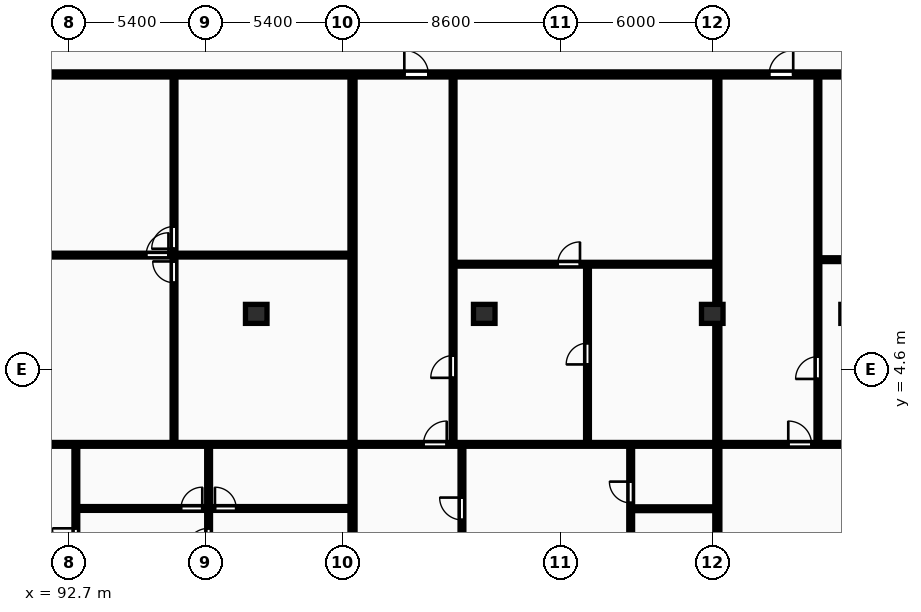
"""IFC4 building model, lengths in metres.
Left out: names, types, materials, properties, quantities, classifications, styles, units other than length and angle.
Written with IfcOpenShell. Run it as: python <this file> out.ifc"""

import sys

from ifc_helpers import new_model, si_unit, direction, frame, frame_2d, origin, origin_2d, place, context, subcontext, project, spatial, rectangle, extrude, element, fill, save


model = new_model("IFC4")
c1 = context("Model", 3, precision=1e-05, world=origin(), true_north=direction((0.0, 1.0)))
c2 = subcontext(c1, "Body", "Model", "MODEL_VIEW")
j1 = project(units=[si_unit("LENGTHUNIT", "METRE"), si_unit("PLANEANGLEUNIT", "RADIAN")], contexts=[c1])
p1 = place(None, origin())
s1 = spatial("IfcSite", under=j1, at=p1, CompositionType="ELEMENT")
p2 = place(p1, origin())
s2 = spatial("IfcBuilding", under=s1, at=p2, CompositionType="ELEMENT")
p3 = place(p2, frame((0.0, 0.0, 80.8)))
s3 = spatial("IfcBuildingStorey", under=s2, at=p3, CompositionType="ELEMENT", Elevation=80.8)
for number, where, z_axis, x_axis in (
    (1, (100.1, 6.8, 0.0), (0.0, 0.0, 1.0), (1.0, 0.0, 0.0)),
    (2, (109.1, 6.8, 0.0), (0.0, 0.0, 1.0), (1.0, 0.0, 0.0)),
    (3, (118.1, 6.8, 0.0), (0.0, 0.0, 1.0), (1.0, 0.0, 0.0)),
    (4, (123.6, 6.8, 0.0), (0.0, 0.0, 1.0), (1.0, 0.0, 0.0)),
):
    element("IfcColumn", number, at=place(p3, frame(where, z_axis=z_axis, x_axis=x_axis)), inside=s3, PredefinedType="COLUMN", context=c2, shape_type="SweptSolid", body=[
        extrude(rectangle(XDim=0.85, YDim=0.75, at=origin_2d()), origin(), (0.0, 0.0, 1.0), 3.25),
    ])
p4 = place(p3, frame((103.9, -8.7, 0.0), z_axis=(0.0, 0.0, 1.0), x_axis=(0.0, 1.0, 0.0)))
e5 = element("IfcWall", 5, at=p4, inside=s3, PredefinedType="PARTITIONING", context=c2, shape_type="SweptSolid", body=[
    extrude(rectangle(XDim=24.87, YDim=0.2, at=frame_2d((12.435, 0.0))), origin(), (0.0, 0.0, 1.0), 2.97),
])
p5 = place(p3, frame((96.855, 1.69, 0.0), z_axis=(0.0, 0.0, 1.0), x_axis=(0.0, 1.0, 0.0)))
e6 = element("IfcWall", 6, at=p5, inside=s3, PredefinedType="PARTITIONING", context=c2, shape_type="SweptSolid", body=[
    extrude(rectangle(XDim=14.5, YDim=0.15, at=frame_2d((7.25, 0.0))), origin(), (0.0, 0.0, 1.0), 2.97),
])
p6 = place(p5, frame((6.34, 0.0, 0.0)))
e7 = element("IfcOpeningElement", 7, at=p6, cuts=e6, PredefinedType="OPENING", context=c2, shape_type="SweptSolid", body=[
    extrude(rectangle(XDim=0.84, YDim=2.04, at=frame_2d((0.42, 1.02))), frame((0.0, 0.085, 0.0), z_axis=(0.0, -1.0, 0.0), x_axis=(1.0, 0.0, 0.0)), (0.0, 0.0, 1.0), 0.17),
])
p7 = place(p5, frame((7.68, 0.0, 0.0)))
e8 = element("IfcOpeningElement", 8, at=p7, cuts=e6, PredefinedType="OPENING", context=c2, shape_type="SweptSolid", body=[
    extrude(rectangle(XDim=0.88, YDim=2.06, at=frame_2d((0.44, 1.03))), frame((0.0, 0.085, 0.0), z_axis=(0.0, -1.0, 0.0), x_axis=(1.0, 0.0, 0.0)), (0.0, 0.0, 1.0), 0.17),
])
p8 = place(p3, frame((90.13, 9.12, 0.0), z_axis=(0.0, 0.0, 1.0), x_axis=(1.0, 0.0, 0.0)))
e9 = element("IfcWall", 9, at=p8, inside=s3, PredefinedType="PARTITIONING", context=c2, shape_type="SweptSolid", body=[
    extrude(rectangle(XDim=13.69, YDim=0.15, at=frame_2d((6.845, 0.0))), origin(), (0.0, 0.0, 1.0), 2.97),
])
p9 = place(p8, frame((5.625, 0.0, 0.0)))
e10 = element("IfcOpeningElement", 10, at=p9, cuts=e9, PredefinedType="OPENING", context=c2, shape_type="SweptSolid", body=[
    extrude(rectangle(XDim=0.88, YDim=2.06, at=frame_2d((0.44, 1.03))), frame((0.0, 0.085, 0.0), z_axis=(0.0, -1.0, 0.0), x_axis=(1.0, 0.0, 0.0)), (0.0, 0.0, 1.0), 0.17),
])
p10 = place(p3, frame((92.98, -8.7, 0.0), z_axis=(0.0, 0.0, 1.0), x_axis=(0.0, 1.0, 0.0)))
e11 = element("IfcWall", 11, at=p10, inside=s3, PredefinedType="PARTITIONING", context=c2, shape_type="SweptSolid", body=[
    extrude(rectangle(XDim=10.31, YDim=0.15, at=frame_2d((5.155, 0.0))), origin(), (0.0, 0.0, 1.0), 2.97),
])
p11 = place(p10, frame((6.116, 0.0, 0.0)))
e12 = element("IfcOpeningElement", 12, at=p11, cuts=e11, PredefinedType="OPENING", context=c2, shape_type="SweptSolid", body=[
    extrude(rectangle(XDim=0.92, YDim=2.08, at=frame_2d((0.46, 1.04))), frame((0.0, 0.085, 0.0), z_axis=(0.0, -1.0, 0.0), x_axis=(1.0, 0.0, 0.0)), (0.0, 0.0, 1.0), 0.17),
])
p12 = place(p3, frame((98.22, -0.86, 0.0), z_axis=(0.0, 0.0, 1.0), x_axis=(0.0, 1.0, 0.0)))
e13 = element("IfcWall", 13, at=p12, inside=s3, PredefinedType="PARTITIONING", context=c2, shape_type="SweptSolid", body=[
    extrude(rectangle(XDim=2.47, YDim=0.15, at=frame_2d((1.235, 0.0))), origin(), (0.0, 0.0, 1.0), 2.97),
])
p13 = place(p3, frame((98.22, -8.7, 0.0), z_axis=(0.0, 0.0, 1.0), x_axis=(0.0, 1.0, 0.0)))
e14 = element("IfcWall", 14, at=p13, inside=s3, PredefinedType="PARTITIONING", context=c2, shape_type="SweptSolid", body=[
    extrude(rectangle(XDim=7.8, YDim=0.15, at=frame_2d((3.9, 0.0))), origin(), (0.0, 0.0, 1.0), 2.97),
])
p14 = place(p13, frame((6.116, 0.0, 0.0)))
e15 = element("IfcOpeningElement", 15, at=p14, cuts=e14, PredefinedType="OPENING", context=c2, shape_type="SweptSolid", body=[
    extrude(rectangle(XDim=0.92, YDim=2.08, at=frame_2d((0.46, 1.04))), frame((0.0, 0.085, 0.0), z_axis=(0.0, -1.0, 0.0), x_axis=(1.0, 0.0, 0.0)), (0.0, 0.0, 1.0), 0.17),
])
p15 = place(p3, frame((93.02, -0.88, 0.0), z_axis=(0.0, 0.0, 1.0), x_axis=(1.0, 0.0, 0.0)))
e16 = element("IfcWall", 16, at=p15, inside=s3, PredefinedType="PARTITIONING", context=c2, shape_type="SweptSolid", body=[
    extrude(rectangle(XDim=10.8, YDim=0.15, at=frame_2d((5.4, 0.0))), origin(), (0.0, 0.0, 1.0), 2.97),
])
p16 = place(p15, frame((4.11, 0.0, 0.0)))
e17 = element("IfcOpeningElement", 17, at=p16, cuts=e16, PredefinedType="OPENING", context=c2, shape_type="SweptSolid", body=[
    extrude(rectangle(XDim=0.84, YDim=2.04, at=frame_2d((0.42, 1.02))), frame((0.0, 0.085, 0.0), z_axis=(0.0, -1.0, 0.0), x_axis=(1.0, 0.0, 0.0)), (0.0, 0.0, 1.0), 0.17),
])
p17 = place(p15, frame((5.45, 0.0, 0.0)))
e18 = element("IfcOpeningElement", 18, at=p17, cuts=e16, PredefinedType="OPENING", context=c2, shape_type="SweptSolid", body=[
    extrude(rectangle(XDim=0.84, YDim=2.04, at=frame_2d((0.42, 1.02))), frame((0.0, 0.085, 0.0), z_axis=(0.0, -1.0, 0.0), x_axis=(1.0, 0.0, 0.0)), (0.0, 0.0, 1.0), 0.17),
])
p18 = place(p3, frame((86.18, 1.65, 0.0), z_axis=(0.0, 0.0, 1.0), x_axis=(1.0, 0.0, 0.0)))
e19 = element("IfcWall", 19, at=p18, inside=s3, PredefinedType="PARTITIONING", context=c2, shape_type="SweptSolid", body=[
    extrude(rectangle(XDim=17.64, YDim=0.15, at=frame_2d((8.82, 0.0))), origin(), (0.0, 0.0, 1.0), 2.97),
])
p19 = place(p18, frame((2.72, 0.0, 0.0)))
e20 = element("IfcOpeningElement", 20, at=p19, cuts=e19, PredefinedType="OPENING", context=c2, shape_type="SweptSolid", body=[
    extrude(rectangle(XDim=0.92, YDim=2.08, at=frame_2d((0.46, 1.04))), frame((0.0, 0.085, 0.0), z_axis=(0.0, -1.0, 0.0), x_axis=(1.0, 0.0, 0.0)), (0.0, 0.0, 1.0), 0.17),
])
p20 = place(p3, frame((118.3, -8.7, 0.0), z_axis=(0.0, 0.0, 1.0), x_axis=(0.0, 1.0, 0.0)))
e21 = element("IfcWall", 21, at=p20, inside=s3, PredefinedType="PARTITIONING", context=c2, shape_type="SweptSolid", body=[
    extrude(rectangle(XDim=24.87, YDim=0.2, at=frame_2d((12.435, 0.0))), origin(), (0.0, 0.0, 1.0), 2.2),
])
p21 = place(p3, frame((113.175, 1.69, 0.0), z_axis=(0.0, 0.0, 1.0), x_axis=(0.0, 1.0, 0.0)))
e22 = element("IfcWall", 22, at=p21, inside=s3, PredefinedType="PARTITIONING", context=c2, shape_type="SweptSolid", body=[
    extrude(rectangle(XDim=7.07, YDim=0.15, at=frame_2d((3.535, 0.0))), origin(), (0.0, 0.0, 1.0), 2.97),
])
p22 = place(p21, frame((3.115, 0.0, 0.0)))
e23 = element("IfcOpeningElement", 23, at=p22, cuts=e22, PredefinedType="OPENING", context=c2, shape_type="SweptSolid", body=[
    extrude(rectangle(XDim=0.84, YDim=2.04, at=frame_2d((0.42, 1.02))), frame((0.0, 0.085, 0.0), z_axis=(0.0, -1.0, 0.0), x_axis=(1.0, 0.0, 0.0)), (0.0, 0.0, 1.0), 0.17),
])
p23 = place(p3, frame((107.93, 8.76, 0.0), z_axis=(0.0, 0.0, 1.0), x_axis=(1.0, 0.0, 0.0)))
e24 = element("IfcWall", 24, at=p23, inside=s3, PredefinedType="PARTITIONING", context=c2, shape_type="SweptSolid", body=[
    extrude(rectangle(XDim=10.29, YDim=0.15, at=frame_2d((5.145, 0.0))), origin(), (0.0, 0.0, 1.0), 2.97),
])
p24 = place(p23, frame((4.069, 0.0, 0.0)))
e25 = element("IfcOpeningElement", 25, at=p24, cuts=e24, PredefinedType="OPENING", context=c2, shape_type="SweptSolid", body=[
    extrude(rectangle(XDim=0.88, YDim=2.06, at=frame_2d((0.44, 1.03))), frame((0.0, 0.085, 0.0), z_axis=(0.0, -1.0, 0.0), x_axis=(1.0, 0.0, 0.0)), (0.0, 0.0, 1.0), 0.17),
])
p25 = place(p3, frame((107.87, 1.69, 0.0), z_axis=(0.0, 0.0, 1.0), x_axis=(0.0, 1.0, 0.0)))
e26 = element("IfcWall", 26, at=p25, inside=s3, PredefinedType="PARTITIONING", context=c2, shape_type="SweptSolid", body=[
    extrude(rectangle(XDim=14.5, YDim=0.15, at=frame_2d((7.25, 0.0))), origin(), (0.0, 0.0, 1.0), 2.97),
])
p26 = place(p25, frame((2.586, 0.0, 0.0)))
e27 = element("IfcOpeningElement", 27, at=p26, cuts=e26, PredefinedType="OPENING", context=c2, shape_type="SweptSolid", body=[
    extrude(rectangle(XDim=0.88, YDim=2.06, at=frame_2d((0.44, 1.03))), frame((0.0, 0.085, 0.0), z_axis=(0.0, -1.0, 0.0), x_axis=(1.0, 0.0, 0.0)), (0.0, 0.0, 1.0), 0.17),
])
p27 = place(p3, frame((108.22, -3.39, 0.0), z_axis=(0.0, 0.0, 1.0), x_axis=(0.0, 1.0, 0.0)))
e28 = element("IfcWall", 28, at=p27, inside=s3, PredefinedType="PARTITIONING", context=c2, shape_type="SweptSolid", body=[
    extrude(rectangle(XDim=5.0, YDim=0.15, at=frame_2d((2.5, 0.0))), origin(), (0.0, 0.0, 1.0), 2.97),
])
p28 = place(p27, frame((2.06, 0.0, 0.0)))
e29 = element("IfcOpeningElement", 29, at=p28, cuts=e28, PredefinedType="OPENING", context=c2, shape_type="SweptSolid", body=[
    extrude(rectangle(XDim=0.88, YDim=2.06, at=frame_2d((0.44, 1.03))), frame((0.0, 0.085, 0.0), z_axis=(0.0, -1.0, 0.0), x_axis=(1.0, 0.0, 0.0)), (0.0, 0.0, 1.0), 0.17),
])
p29 = place(p3, frame((114.94, -0.89, 0.0), z_axis=(0.0, 0.0, 1.0), x_axis=(1.0, 0.0, 0.0)))
e30 = element("IfcWall", 30, at=p29, inside=s3, PredefinedType="PARTITIONING", context=c2, shape_type="SweptSolid", body=[
    extrude(rectangle(XDim=3.28, YDim=0.15, at=frame_2d((1.64, 0.0))), origin(), (0.0, 0.0, 1.0), 2.97),
])
p30 = place(p3, frame((114.88, -8.7, 0.0), z_axis=(0.0, 0.0, 1.0), x_axis=(0.0, 1.0, 0.0)))
e31 = element("IfcWall", 31, at=p30, inside=s3, PredefinedType="PARTITIONING", context=c2, shape_type="SweptSolid", body=[
    extrude(rectangle(XDim=10.31, YDim=0.15, at=frame_2d((5.155, 0.0))), origin(), (0.0, 0.0, 1.0), 2.97),
])
p31 = place(p30, frame((5.55, 0.0, 0.0)))
e32 = element("IfcOpeningElement", 32, at=p31, cuts=e31, PredefinedType="OPENING", context=c2, shape_type="SweptSolid", body=[
    extrude(rectangle(XDim=0.84, YDim=2.04, at=frame_2d((0.42, 1.02))), frame((0.0, 0.085, 0.0), z_axis=(0.0, -1.0, 0.0), x_axis=(1.0, 0.0, 0.0)), (0.0, 0.0, 1.0), 0.17),
])
p32 = place(p30, frame((8.04, 0.0, 0.0)))
e33 = element("IfcOpeningElement", 33, at=p32, cuts=e31, PredefinedType="OPENING", context=c2, shape_type="SweptSolid", body=[
    extrude(rectangle(XDim=0.84, YDim=2.04, at=frame_2d((0.42, 1.02))), frame((0.0, 0.085, 0.0), z_axis=(0.0, -1.0, 0.0), x_axis=(1.0, 0.0, 0.0)), (0.0, 0.0, 1.0), 0.17),
])
p33 = place(p30, frame((3.95, 0.0, 0.0)))
e34 = element("IfcOpeningElement", 34, at=p33, cuts=e31, PredefinedType="OPENING", context=c2, shape_type="SweptSolid", body=[
    extrude(rectangle(XDim=0.88, YDim=2.06, at=frame_2d((0.44, 1.03))), frame((0.0, 0.085, 0.0), z_axis=(0.0, -1.0, 0.0), x_axis=(1.0, 0.0, 0.0)), (0.0, 0.0, 1.0), 0.17),
])
p34 = place(p3, frame((103.98, 1.65, 0.0), z_axis=(0.0, 0.0, 1.0), x_axis=(1.0, 0.0, 0.0)))
e35 = element("IfcWall", 35, at=p34, inside=s3, PredefinedType="PARTITIONING", context=c2, shape_type="SweptSolid", body=[
    extrude(rectangle(XDim=14.24, YDim=0.15, at=frame_2d((7.12, 0.0))), origin(), (0.0, 0.0, 1.0), 2.97),
])
p35 = place(p34, frame((2.72, 0.0, 0.0)))
e36 = element("IfcOpeningElement", 36, at=p35, cuts=e35, PredefinedType="OPENING", context=c2, shape_type="SweptSolid", body=[
    extrude(rectangle(XDim=0.92, YDim=2.08, at=frame_2d((0.46, 1.04))), frame((0.0, 0.085, 0.0), z_axis=(0.0, -1.0, 0.0), x_axis=(1.0, 0.0, 0.0)), (0.0, 0.0, 1.0), 0.17),
])
p36 = place(p3, frame((122.33, 8.94, 0.0), z_axis=(0.0, 0.0, 1.0), x_axis=(1.0, 0.0, 0.0)))
e37 = element("IfcWall", 37, at=p36, inside=s3, PredefinedType="PARTITIONING", context=c2, shape_type="SweptSolid", body=[
    extrude(rectangle(XDim=8.29, YDim=0.15, at=frame_2d((4.145, 0.0))), origin(), (0.0, 0.0, 1.0), 2.97),
])
p37 = place(p36, frame((3.705, 0.0, 0.0)))
e38 = element("IfcOpeningElement", 38, at=p37, cuts=e37, PredefinedType="OPENING", context=c2, shape_type="SweptSolid", body=[
    extrude(rectangle(XDim=0.88, YDim=2.06, at=frame_2d((0.44, 1.03))), frame((0.0, 0.085, 0.0), z_axis=(0.0, -1.0, 0.0), x_axis=(1.0, 0.0, 0.0)), (0.0, 0.0, 1.0), 0.17),
])
p38 = place(p3, frame((122.27, 1.69, 0.0), z_axis=(0.0, 0.0, 1.0), x_axis=(0.0, 1.0, 0.0)))
e39 = element("IfcWall", 39, at=p38, inside=s3, PredefinedType="PARTITIONING", context=c2, shape_type="SweptSolid", body=[
    extrude(rectangle(XDim=14.5, YDim=0.15, at=frame_2d((7.25, 0.0))), origin(), (0.0, 0.0, 1.0), 2.97),
])
p39 = place(p38, frame((2.542, 0.0, 0.0)))
e40 = element("IfcOpeningElement", 40, at=p39, cuts=e39, PredefinedType="OPENING", context=c2, shape_type="SweptSolid", body=[
    extrude(rectangle(XDim=0.88, YDim=2.06, at=frame_2d((0.44, 1.03))), frame((0.0, 0.085, 0.0), z_axis=(0.0, -1.0, 0.0), x_axis=(1.0, 0.0, 0.0)), (0.0, 0.0, 1.0), 0.17),
])
p40 = place(p3, frame((118.38, 1.65, 0.0), z_axis=(0.0, 0.0, 1.0), x_axis=(1.0, 0.0, 0.0)))
e41 = element("IfcWall", 41, at=p40, inside=s3, PredefinedType="PARTITIONING", context=c2, shape_type="SweptSolid", body=[
    extrude(rectangle(XDim=12.24, YDim=0.15, at=frame_2d((6.12, 0.0))), origin(), (0.0, 0.0, 1.0), 2.97),
])
p41 = place(p40, frame((2.72, 0.0, 0.0)))
e42 = element("IfcOpeningElement", 42, at=p41, cuts=e41, PredefinedType="OPENING", context=c2, shape_type="SweptSolid", body=[
    extrude(rectangle(XDim=0.92, YDim=2.08, at=frame_2d((0.46, 1.04))), frame((0.0, 0.085, 0.0), z_axis=(0.0, -1.0, 0.0), x_axis=(1.0, 0.0, 0.0)), (0.0, 0.0, 1.0), 0.17),
])
p42 = place(p3, frame((72.7, 16.25, 0.0), z_axis=(0.0, 0.0, 1.0), x_axis=(1.0, 0.0, 0.0)))
e43 = element("IfcWall", 43, at=p42, inside=s3, PredefinedType="PARTITIONING", context=c2, shape_type="SweptSolid", body=[
    extrude(rectangle(XDim=58.0, YDim=0.2, at=frame_2d((29.0, 0.0))), origin(), (0.0, 0.0, 1.0), 2.97),
])
p43 = place(p42, frame((2.77, 0.0, 0.0)))
e44 = element("IfcOpeningElement", 44, at=p43, cuts=e43, PredefinedType="OPENING", context=c2, shape_type="SweptSolid", body=[
    extrude(rectangle(XDim=0.95, YDim=2.15, at=frame_2d((0.475, 1.075))), frame((0.0, 0.11, 0.0), z_axis=(0.0, -1.0, 0.0), x_axis=(1.0, 0.0, 0.0)), (0.0, 0.0, 1.0), 0.22),
])
p44 = place(p42, frame((15.445, 0.0, 0.0)))
e45 = element("IfcOpeningElement", 45, at=p44, cuts=e43, PredefinedType="OPENING", context=c2, shape_type="SweptSolid", body=[
    extrude(rectangle(XDim=0.95, YDim=2.15, at=frame_2d((0.475, 1.075))), frame((0.0, 0.11, 0.0), z_axis=(0.0, -1.0, 0.0), x_axis=(1.0, 0.0, 0.0)), (0.0, 0.0, 1.0), 0.22),
])
p45 = place(p42, frame((33.245, 0.0, 0.0)))
e46 = element("IfcOpeningElement", 46, at=p45, cuts=e43, PredefinedType="OPENING", context=c2, shape_type="SweptSolid", body=[
    extrude(rectangle(XDim=0.95, YDim=2.15, at=frame_2d((0.475, 1.075))), frame((0.0, 0.11, 0.0), z_axis=(0.0, -1.0, 0.0), x_axis=(1.0, 0.0, 0.0)), (0.0, 0.0, 1.0), 0.22),
])
p46 = place(p42, frame((47.645, 0.0, 0.0)))
e47 = element("IfcOpeningElement", 47, at=p46, cuts=e43, PredefinedType="OPENING", context=c2, shape_type="SweptSolid", body=[
    extrude(rectangle(XDim=0.95, YDim=2.15, at=frame_2d((0.475, 1.075))), frame((0.0, 0.11, 0.0), z_axis=(0.0, -1.0, 0.0), x_axis=(1.0, 0.0, 0.0)), (0.0, 0.0, 1.0), 0.22),
])
p47 = place(p6, origin())
e48 = element("IfcDoor", 48, at=p47, inside=s3, OperationType="SINGLE_SWING_RIGHT", PredefinedType="DOOR", context=c2, shape_type="SweptSolid", body=[
    extrude(rectangle(XDim=0.84, YDim=2.04, at=frame_2d((0.42, 1.02))), frame((0.0, 0.025, 0.0), z_axis=(0.0, -1.0, 0.0), x_axis=(1.0, 0.0, 0.0)), (0.0, 0.0, 1.0), 0.05),
])
fill(e7, e48)
p48 = place(p7, origin())
e49 = element("IfcDoor", 49, at=p48, inside=s3, OperationType="SINGLE_SWING_LEFT", PredefinedType="DOOR", context=c2, shape_type="SweptSolid", body=[
    extrude(rectangle(XDim=0.88, YDim=2.06, at=frame_2d((0.44, 1.03))), frame((0.0, 0.025, 0.0), z_axis=(0.0, -1.0, 0.0), x_axis=(1.0, 0.0, 0.0)), (0.0, 0.0, 1.0), 0.05),
])
fill(e8, e49)
p49 = place(p9, origin())
e50 = element("IfcDoor", 50, at=p49, inside=s3, OperationType="SINGLE_SWING_RIGHT", PredefinedType="DOOR", context=c2, shape_type="SweptSolid", body=[
    extrude(rectangle(XDim=0.88, YDim=2.06, at=frame_2d((0.44, 1.03))), frame((0.0, 0.025, 0.0), z_axis=(0.0, -1.0, 0.0), x_axis=(1.0, 0.0, 0.0)), (0.0, 0.0, 1.0), 0.05),
])
fill(e10, e50)
p50 = place(p11, origin())
e51 = element("IfcDoor", 51, at=p50, inside=s3, OperationType="SINGLE_SWING_RIGHT", PredefinedType="DOOR", context=c2, shape_type="SweptSolid", body=[
    extrude(rectangle(XDim=0.92, YDim=2.08, at=frame_2d((0.46, 1.04))), frame((0.0, 0.025, 0.0), z_axis=(0.0, -1.0, 0.0), x_axis=(1.0, 0.0, 0.0)), (0.0, 0.0, 1.0), 0.05),
])
fill(e12, e51)
p51 = place(p14, origin())
e52 = element("IfcDoor", 52, at=p51, inside=s3, OperationType="SINGLE_SWING_LEFT", PredefinedType="DOOR", context=c2, shape_type="SweptSolid", body=[
    extrude(rectangle(XDim=0.92, YDim=2.08, at=frame_2d((0.46, 1.04))), frame((0.0, 0.025, 0.0), z_axis=(0.0, -1.0, 0.0), x_axis=(1.0, 0.0, 0.0)), (0.0, 0.0, 1.0), 0.05),
])
fill(e15, e52)
p52 = place(p16, origin())
e53 = element("IfcDoor", 53, at=p52, inside=s3, OperationType="SINGLE_SWING_RIGHT", PredefinedType="DOOR", context=c2, shape_type="SweptSolid", body=[
    extrude(rectangle(XDim=0.84, YDim=2.04, at=frame_2d((0.42, 1.02))), frame((0.0, 0.025, 0.0), z_axis=(0.0, -1.0, 0.0), x_axis=(1.0, 0.0, 0.0)), (0.0, 0.0, 1.0), 0.05),
])
fill(e17, e53)
p53 = place(p17, origin())
e54 = element("IfcDoor", 54, at=p53, inside=s3, OperationType="SINGLE_SWING_LEFT", PredefinedType="DOOR", context=c2, shape_type="SweptSolid", body=[
    extrude(rectangle(XDim=0.84, YDim=2.04, at=frame_2d((0.42, 1.02))), frame((0.0, 0.025, 0.0), z_axis=(0.0, -1.0, 0.0), x_axis=(1.0, 0.0, 0.0)), (0.0, 0.0, 1.0), 0.05),
])
fill(e18, e54)
p54 = place(p22, origin())
e55 = element("IfcDoor", 55, at=p54, inside=s3, OperationType="SINGLE_SWING_LEFT", PredefinedType="DOOR", context=c2, shape_type="SweptSolid", body=[
    extrude(rectangle(XDim=0.84, YDim=2.04, at=frame_2d((0.42, 1.02))), frame((0.0, 0.025, 0.0), z_axis=(0.0, -1.0, 0.0), x_axis=(1.0, 0.0, 0.0)), (0.0, 0.0, 1.0), 0.05),
])
fill(e23, e55)
p55 = place(p24, origin())
e56 = element("IfcDoor", 56, at=p55, inside=s3, OperationType="SINGLE_SWING_RIGHT", PredefinedType="DOOR", context=c2, shape_type="SweptSolid", body=[
    extrude(rectangle(XDim=0.88, YDim=2.06, at=frame_2d((0.44, 1.03))), frame((0.0, 0.025, 0.0), z_axis=(0.0, -1.0, 0.0), x_axis=(1.0, 0.0, 0.0)), (0.0, 0.0, 1.0), 0.05),
])
fill(e25, e56)
p56 = place(p26, origin())
e57 = element("IfcDoor", 57, at=p56, inside=s3, OperationType="SINGLE_SWING_LEFT", PredefinedType="DOOR", context=c2, shape_type="SweptSolid", body=[
    extrude(rectangle(XDim=0.88, YDim=2.06, at=frame_2d((0.44, 1.03))), frame((0.0, 0.025, 0.0), z_axis=(0.0, -1.0, 0.0), x_axis=(1.0, 0.0, 0.0)), (0.0, 0.0, 1.0), 0.05),
])
fill(e27, e57)
p57 = place(p28, origin())
e58 = element("IfcDoor", 58, at=p57, inside=s3, OperationType="SINGLE_SWING_RIGHT", PredefinedType="DOOR", context=c2, shape_type="SweptSolid", body=[
    extrude(rectangle(XDim=0.88, YDim=2.06, at=frame_2d((0.44, 1.03))), frame((0.0, 0.025, 0.0), z_axis=(0.0, -1.0, 0.0), x_axis=(1.0, 0.0, 0.0)), (0.0, 0.0, 1.0), 0.05),
])
fill(e29, e58)
p58 = place(p32, origin())
e59 = element("IfcDoor", 59, at=p58, inside=s3, OperationType="SINGLE_SWING_RIGHT", PredefinedType="DOOR", context=c2, shape_type="SweptSolid", body=[
    extrude(rectangle(XDim=0.84, YDim=2.04, at=frame_2d((0.42, 1.02))), frame((0.0, 0.025, 0.0), z_axis=(0.0, -1.0, 0.0), x_axis=(1.0, 0.0, 0.0)), (0.0, 0.0, 1.0), 0.05),
])
fill(e33, e59)
p59 = place(p35, origin())
e60 = element("IfcDoor", 60, at=p59, inside=s3, OperationType="SINGLE_SWING_RIGHT", PredefinedType="DOOR", context=c2, shape_type="SweptSolid", body=[
    extrude(rectangle(XDim=0.92, YDim=2.08, at=frame_2d((0.46, 1.04))), frame((0.0, 0.025, 0.0), z_axis=(0.0, -1.0, 0.0), x_axis=(1.0, 0.0, 0.0)), (0.0, 0.0, 1.0), 0.05),
])
fill(e36, e60)
p60 = place(p39, origin())
e61 = element("IfcDoor", 61, at=p60, inside=s3, OperationType="SINGLE_SWING_LEFT", PredefinedType="DOOR", context=c2, shape_type="SweptSolid", body=[
    extrude(rectangle(XDim=0.88, YDim=2.06, at=frame_2d((0.44, 1.03))), frame((0.0, 0.025, 0.0), z_axis=(0.0, -1.0, 0.0), x_axis=(1.0, 0.0, 0.0)), (0.0, 0.0, 1.0), 0.05),
])
fill(e40, e61)
p61 = place(p41, origin())
e62 = element("IfcDoor", 62, at=p61, inside=s3, OperationType="SINGLE_SWING_LEFT", PredefinedType="DOOR", context=c2, shape_type="SweptSolid", body=[
    extrude(rectangle(XDim=0.92, YDim=2.08, at=frame_2d((0.46, 1.04))), frame((0.0, 0.025, 0.0), z_axis=(0.0, -1.0, 0.0), x_axis=(1.0, 0.0, 0.0)), (0.0, 0.0, 1.0), 0.05),
])
fill(e42, e62)
p62 = place(p45, origin())
e63 = element("IfcDoor", 63, at=p62, inside=s3, OperationType="SINGLE_SWING_LEFT", PredefinedType="DOOR", context=c2, shape_type="SweptSolid", body=[
    extrude(rectangle(XDim=0.95, YDim=2.15, at=frame_2d((0.475, 1.075))), frame((0.0, 0.025, 0.0), z_axis=(0.0, -1.0, 0.0), x_axis=(1.0, 0.0, 0.0)), (0.0, 0.0, 1.0), 0.05),
])
fill(e46, e63)
p63 = place(p46, origin())
e64 = element("IfcDoor", 64, at=p63, inside=s3, OperationType="SINGLE_SWING_RIGHT", PredefinedType="DOOR", context=c2, shape_type="SweptSolid", body=[
    extrude(rectangle(XDim=0.95, YDim=2.15, at=frame_2d((0.475, 1.075))), frame((0.0, 0.025, 0.0), z_axis=(0.0, -1.0, 0.0), x_axis=(1.0, 0.0, 0.0)), (0.0, 0.0, 1.0), 0.05),
])
fill(e47, e64)
save(model, sys.argv[1])
